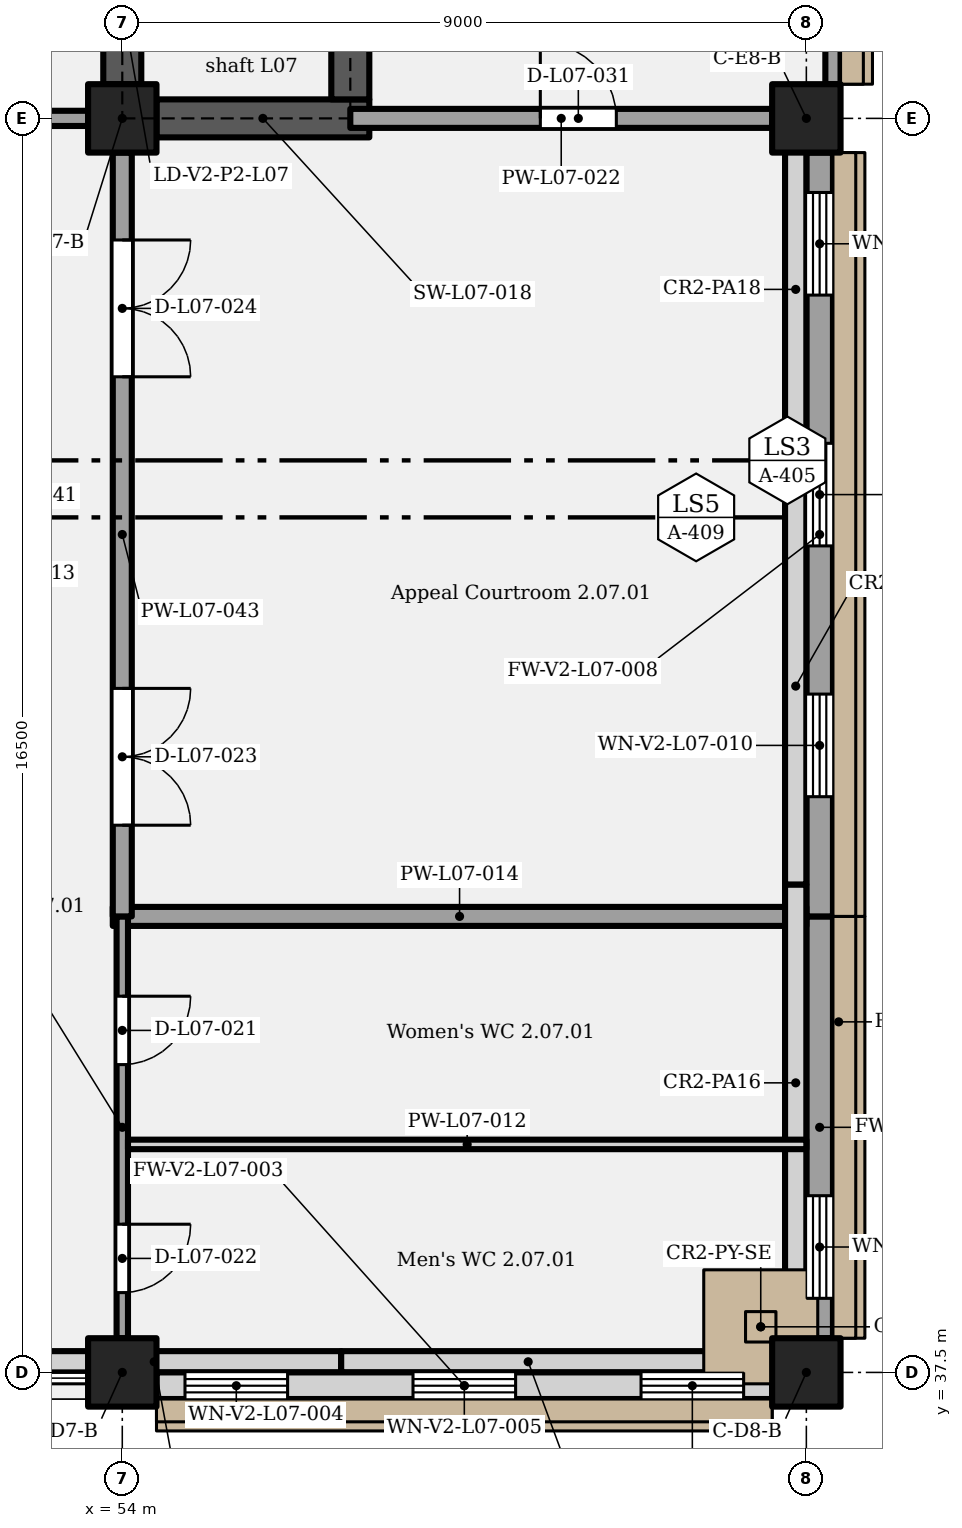
"""IFC4 building model, lengths in metres.
Left out: names, types, materials, properties, quantities, classifications, styles, units other than length and angle.
Written with IfcOpenShell. Run it as: python <this file> out.ifc"""

import sys

from ifc_helpers import new_model, si_unit, direction, frame, frame_2d, origin, origin_2d, place, context, subcontext, project, spatial, rectangle, extrude, element, fill, save


model = new_model("IFC4")
c1 = context("Model", 3, precision=1e-05, world=origin(), true_north=direction((0.0, 1.0)))
c2 = subcontext(c1, "Body", "Model", "MODEL_VIEW")
j1 = project(units=[si_unit("LENGTHUNIT", "METRE"), si_unit("PLANEANGLEUNIT", "RADIAN")], contexts=[c1])
p1 = place(None, origin())
s1 = spatial("IfcSite", under=j1, at=p1, CompositionType="ELEMENT")
p2 = place(p1, origin())
s2 = spatial("IfcBuilding", under=s1, at=p2, CompositionType="ELEMENT")
p3 = place(p2, frame((0.0, 0.0, 39.0)))
s3 = spatial("IfcBuildingStorey", under=s2, at=p3, CompositionType="ELEMENT", Elevation=39.0)
for number, where, z_axis, x_axis in (
    (1, (54.0, 37.5, 0.0), (0.0, 0.0, 1.0), (1.0, 0.0, 0.0)),
    (2, (63.0, 37.5, 0.0), (0.0, 0.0, 1.0), (1.0, 0.0, 0.0)),
    (3, (54.0, 54.0, 0.0), (0.0, 0.0, 1.0), (1.0, 0.0, 0.0)),
    (4, (63.0, 54.0, 0.0), (0.0, 0.0, 1.0), (1.0, 0.0, 0.0)),
):
    element("IfcColumn", number, at=place(p3, frame(where, z_axis=z_axis, x_axis=x_axis)), inside=s3, PredefinedType="COLUMN", context=c2, shape_type="SweptSolid", body=[
        extrude(rectangle(XDim=0.9, YDim=0.9, at=origin_2d()), origin(), (0.0, 0.0, 1.0), 5.4),
    ])
p4 = place(p3, frame((54.45, 54.0, 0.0), z_axis=(0.0, 0.0, 1.0), x_axis=(1.0, 0.0, 0.0)))
e5 = element("IfcWall", 5, at=p4, inside=s3, PredefinedType="SHEAR", context=c2, shape_type="SweptSolid", body=[
    extrude(rectangle(XDim=2.8, YDim=0.5, at=frame_2d((1.4, 0.0))), origin(), (0.0, 0.0, 1.0), 5.15),
])
p5 = place(p3, frame((57.0, 54.25, 0.0), z_axis=(0.0, 0.0, 1.0), x_axis=(0.0, 1.0, 0.0)))
e6 = element("IfcWall", 6, at=p5, inside=s3, PredefinedType="SHEAR", context=c2, shape_type="SweptSolid", body=[
    extrude(rectangle(XDim=2.5, YDim=0.5, at=frame_2d((1.25, 0.0))), origin(), (0.0, 0.0, 1.0), 5.15),
])
p6 = place(p3, frame((54.0, 54.45, 0.0), z_axis=(0.0, 0.0, 1.0), x_axis=(0.0, 1.0, 0.0)))
e7 = element("IfcWall", 7, at=p6, inside=s3, PredefinedType="SHEAR", context=c2, shape_type="SweptSolid", body=[
    extrude(rectangle(XDim=11.1, YDim=0.5, at=frame_2d((5.55, 0.0))), origin(), (0.0, 0.0, 1.0), 5.15),
])
p7 = place(p6, frame((0.5, 0.0, 0.0)))
e8 = element("IfcOpeningElement", 8, at=p7, cuts=e7, PredefinedType="OPENING", context=c2, shape_type="SweptSolid", body=[
    extrude(rectangle(XDim=1.1, YDim=2.1, at=frame_2d((0.55, 1.05))), frame((0.0, 0.26, 0.0), z_axis=(0.0, -1.0, 0.0), x_axis=(1.0, 0.0, 0.0)), (0.0, 0.0, 1.0), 0.52),
])
p8 = place(p6, frame((2.95, 0.0, 0.0)))
e9 = element("IfcOpeningElement", 9, at=p8, cuts=e7, PredefinedType="OPENING", context=c2, shape_type="SweptSolid", body=[
    extrude(rectangle(XDim=1.2, YDim=2.1, at=frame_2d((0.6, 1.05))), frame((0.0, 0.26, 0.0), z_axis=(0.0, -1.0, 0.0), x_axis=(1.0, 0.0, 0.0)), (0.0, 0.0, 1.0), 0.52),
])
p9 = place(p3, frame((54.45, 37.325, 0.0), z_axis=(0.0, 0.0, 1.0), x_axis=(1.0, 0.0, 0.0)))
e10 = element("IfcWall", 10, at=p9, inside=s3, PredefinedType="SOLIDWALL", context=c2, shape_type="SweptSolid", body=[
    extrude(rectangle(XDim=8.1, YDim=0.35, at=frame_2d((4.05, 0.0))), origin(), (0.0, 0.0, 1.0), 5.15),
])
p10 = place(p9, frame((0.375, 0.0, 1.2)))
e11 = element("IfcOpeningElement", 11, at=p10, cuts=e10, PredefinedType="OPENING", context=c2, shape_type="SweptSolid", body=[
    extrude(rectangle(XDim=1.35, YDim=3.0, at=frame_2d((0.675, 1.5))), frame((0.0, 0.185, 0.0), z_axis=(0.0, -1.0, 0.0), x_axis=(1.0, 0.0, 0.0)), (0.0, 0.0, 1.0), 0.37),
])
p11 = place(p9, frame((3.375, 0.0, 1.2)))
e12 = element("IfcOpeningElement", 12, at=p11, cuts=e10, PredefinedType="OPENING", context=c2, shape_type="SweptSolid", body=[
    extrude(rectangle(XDim=1.35, YDim=3.0, at=frame_2d((0.675, 1.5))), frame((0.0, 0.185, 0.0), z_axis=(0.0, -1.0, 0.0), x_axis=(1.0, 0.0, 0.0)), (0.0, 0.0, 1.0), 0.37),
])
p12 = place(p9, frame((6.375, 0.0, 1.2)))
e13 = element("IfcOpeningElement", 13, at=p12, cuts=e10, PredefinedType="OPENING", context=c2, shape_type="SweptSolid", body=[
    extrude(rectangle(XDim=1.35, YDim=3.0, at=frame_2d((0.675, 1.5))), frame((0.0, 0.185, 0.0), z_axis=(0.0, -1.0, 0.0), x_axis=(1.0, 0.0, 0.0)), (0.0, 0.0, 1.0), 0.37),
])
p13 = place(p3, frame((63.175, 37.95, 0.0), z_axis=(0.0, 0.0, 1.0), x_axis=(0.0, 1.0, 0.0)))
e14 = element("IfcWall", 14, at=p13, inside=s3, PredefinedType="SOLIDWALL", context=c2, shape_type="SweptSolid", body=[
    extrude(rectangle(XDim=5.55, YDim=0.35, at=frame_2d((2.775, 0.0))), origin(), (0.0, 0.0, 1.0), 5.15),
])
p14 = place(p13, frame((0.525, 0.0, 1.2)))
e15 = element("IfcOpeningElement", 15, at=p14, cuts=e14, PredefinedType="OPENING", context=c2, shape_type="SweptSolid", body=[
    extrude(rectangle(XDim=1.35, YDim=3.0, at=frame_2d((0.675, 1.5))), frame((0.0, 0.185, 0.0), z_axis=(0.0, -1.0, 0.0), x_axis=(1.0, 0.0, 0.0)), (0.0, 0.0, 1.0), 0.37),
])
p15 = place(p3, frame((63.175, 43.5, 0.0), z_axis=(0.0, 0.0, 1.0), x_axis=(0.0, 1.0, 0.0)))
e16 = element("IfcWall", 16, at=p15, inside=s3, PredefinedType="SOLIDWALL", context=c2, shape_type="SweptSolid", body=[
    extrude(rectangle(XDim=10.05, YDim=0.35, at=frame_2d((5.025, 0.0))), origin(), (0.0, 0.0, 1.0), 5.15),
])
p16 = place(p15, frame((1.575, 0.0, 1.2)))
e17 = element("IfcOpeningElement", 17, at=p16, cuts=e16, PredefinedType="OPENING", context=c2, shape_type="SweptSolid", body=[
    extrude(rectangle(XDim=1.35, YDim=3.0, at=frame_2d((0.675, 1.5))), frame((0.0, 0.185, 0.0), z_axis=(0.0, -1.0, 0.0), x_axis=(1.0, 0.0, 0.0)), (0.0, 0.0, 1.0), 0.37),
])
p17 = place(p15, frame((4.875, 0.0, 1.2)))
e18 = element("IfcOpeningElement", 18, at=p17, cuts=e16, PredefinedType="OPENING", context=c2, shape_type="SweptSolid", body=[
    extrude(rectangle(XDim=1.35, YDim=3.0, at=frame_2d((0.675, 1.5))), frame((0.0, 0.185, 0.0), z_axis=(0.0, -1.0, 0.0), x_axis=(1.0, 0.0, 0.0)), (0.0, 0.0, 1.0), 0.37),
])
p18 = place(p15, frame((8.175, 0.0, 1.2)))
e19 = element("IfcOpeningElement", 19, at=p18, cuts=e16, PredefinedType="OPENING", context=c2, shape_type="SweptSolid", body=[
    extrude(rectangle(XDim=1.35, YDim=3.0, at=frame_2d((0.675, 1.5))), frame((0.0, 0.185, 0.0), z_axis=(0.0, -1.0, 0.0), x_axis=(1.0, 0.0, 0.0)), (0.0, 0.0, 1.0), 0.37),
])
p19 = place(p3, frame((63.35, 54.45, 0.0), z_axis=(0.0, 0.0, 1.0), x_axis=(0.0, 1.0, 0.0)))
e20 = element("IfcWall", 20, at=p19, inside=s3, PredefinedType="SOLIDWALL", context=c2, shape_type="SweptSolid", body=[
    extrude(rectangle(XDim=2.55, YDim=0.2, at=frame_2d((1.275, 0.0))), origin(), (0.0, 0.0, 1.0), 5.15),
])
p20 = place(p19, frame((0.525, 0.0, 1.05)))
e21 = element("IfcOpeningElement", 21, at=p20, cuts=e20, PredefinedType="OPENING", context=c2, shape_type="SweptSolid", body=[
    extrude(rectangle(XDim=1.05, YDim=2.4, at=frame_2d((0.525, 1.2))), frame((0.0, 0.11, 0.0), z_axis=(0.0, -1.0, 0.0), x_axis=(1.0, 0.0, 0.0)), (0.0, 0.0, 1.0), 0.22),
])
p21 = place(p3, frame((61.8, 38.1, 5.4), z_axis=(0.0, 0.0, 1.0), x_axis=(1.0, 0.0, 0.0)))
e22 = element("IfcWall", 22, at=p21, inside=s3, PredefinedType="SOLIDWALL", context=c2, shape_type="SweptSolid", body=[
    extrude(rectangle(XDim=1.2, YDim=1.2, at=frame_2d((0.6, 0.0))), origin(), (0.0, 0.0, 1.0), 3.0),
])
p22 = place(p3, frame((51.96, 37.64, 5.4), z_axis=(0.0, 0.0, 1.0), x_axis=(1.0, 0.0, 0.0)))
e23 = element("IfcWall", 23, at=p22, inside=s3, PredefinedType="PARAPET", context=c2, shape_type="SweptSolid", body=[
    extrude(rectangle(XDim=4.92, YDim=0.28, at=frame_2d((2.46, 0.0))), origin(), (0.0, 0.0, 1.0), 1.4),
])
p23 = place(p3, frame((56.88, 37.64, 5.4), z_axis=(0.0, 0.0, 1.0), x_axis=(1.0, 0.0, 0.0)))
e24 = element("IfcWall", 24, at=p23, inside=s3, PredefinedType="PARAPET", context=c2, shape_type="SweptSolid", body=[
    extrude(rectangle(XDim=4.92, YDim=0.28, at=frame_2d((2.46, 0.0))), origin(), (0.0, 0.0, 1.0), 1.2),
])
p24 = place(p3, frame((62.86, 38.7, 5.4), z_axis=(0.0, 0.0, 1.0), x_axis=(0.0, 1.0, 0.0)))
e25 = element("IfcWall", 25, at=p24, inside=s3, PredefinedType="PARAPET", context=c2, shape_type="SweptSolid", body=[
    extrude(rectangle(XDim=5.22, YDim=0.28, at=frame_2d((2.61, 0.0))), origin(), (0.0, 0.0, 1.0), 1.2),
])
p25 = place(p3, frame((62.86, 43.92, 5.4), z_axis=(0.0, 0.0, 1.0), x_axis=(0.0, 1.0, 0.0)))
e26 = element("IfcWall", 26, at=p25, inside=s3, PredefinedType="PARAPET", context=c2, shape_type="SweptSolid", body=[
    extrude(rectangle(XDim=5.22, YDim=0.28, at=frame_2d((2.61, 0.0))), origin(), (0.0, 0.0, 1.0), 1.4),
])
p26 = place(p3, frame((62.86, 49.14, 5.4), z_axis=(0.0, 0.0, 1.0), x_axis=(0.0, 1.0, 0.0)))
e27 = element("IfcWall", 27, at=p26, inside=s3, PredefinedType="PARAPET", context=c2, shape_type="SweptSolid", body=[
    extrude(rectangle(XDim=5.22, YDim=0.28, at=frame_2d((2.61, 0.0))), origin(), (0.0, 0.0, 1.0), 1.6),
])
p27 = place(p3, frame((54.075, 40.5, 0.0), z_axis=(0.0, 0.0, 1.0), x_axis=(1.0, 0.0, 0.0)))
e28 = element("IfcWall", 28, at=p27, inside=s3, PredefinedType="PARTITIONING", context=c2, shape_type="SweptSolid", body=[
    extrude(rectangle(XDim=8.925, YDim=0.125, at=frame_2d((4.462, 0.0))), origin(), (0.0, 0.0, 1.0), 5.15),
])
p28 = place(p3, frame((53.875, 43.5, 0.0), z_axis=(0.0, 0.0, 1.0), x_axis=(1.0, 0.0, 0.0)))
e29 = element("IfcWall", 29, at=p28, inside=s3, PredefinedType="PARTITIONING", context=c2, shape_type="SweptSolid", body=[
    extrude(rectangle(XDim=9.125, YDim=0.25, at=frame_2d((4.562, 0.0))), origin(), (0.0, 0.0, 1.0), 5.15),
])
p29 = place(p3, frame((49.5, 54.0, 0.0), z_axis=(0.0, 0.0, 1.0), x_axis=(1.0, 0.0, 0.0)))
e30 = element("IfcWall", 30, at=p29, inside=s3, PredefinedType="PARTITIONING", context=c2, shape_type="SweptSolid", body=[
    extrude(rectangle(XDim=4.05, YDim=0.2, at=frame_2d((2.025, 0.0))), origin(), (0.0, 0.0, 1.0), 4.4),
])
p30 = place(p29, frame((1.35, 0.0, 0.0)))
e31 = element("IfcOpeningElement", 31, at=p30, cuts=e30, PredefinedType="OPENING", context=c2, shape_type="SweptSolid", body=[
    extrude(rectangle(XDim=1.8, YDim=2.1, at=frame_2d((0.9, 1.05))), frame((0.0, 0.11, 0.0), z_axis=(0.0, -1.0, 0.0), x_axis=(1.0, 0.0, 0.0)), (0.0, 0.0, 1.0), 0.22),
])
p31 = place(p3, frame((57.0, 54.0, 0.0), z_axis=(0.0, 0.0, 1.0), x_axis=(1.0, 0.0, 0.0)))
e32 = element("IfcWall", 32, at=p31, inside=s3, PredefinedType="PARTITIONING", context=c2, shape_type="SweptSolid", body=[
    extrude(rectangle(XDim=5.55, YDim=0.25, at=frame_2d((2.775, 0.0))), origin(), (0.0, 0.0, 1.0), 4.4),
])
p32 = place(p31, frame((2.5, 0.0, 0.0)))
e33 = element("IfcOpeningElement", 33, at=p32, cuts=e32, PredefinedType="OPENING", context=c2, shape_type="SweptSolid", body=[
    extrude(rectangle(XDim=1.0, YDim=2.1, at=frame_2d((0.5, 1.05))), frame((0.0, 0.135, 0.0), z_axis=(0.0, -1.0, 0.0), x_axis=(1.0, 0.0, 0.0)), (0.0, 0.0, 1.0), 0.27),
])
p33 = place(p3, frame((54.0, 37.95, 0.0), z_axis=(0.0, 0.0, 1.0), x_axis=(0.0, 1.0, 0.0)))
e34 = element("IfcWall", 34, at=p33, inside=s3, PredefinedType="PARTITIONING", context=c2, shape_type="SweptSolid", body=[
    extrude(rectangle(XDim=5.55, YDim=0.15, at=frame_2d((2.775, 0.0))), origin(), (0.0, 0.0, 1.0), 4.2),
])
p34 = place(p33, frame((4.5, 0.0, 0.0), z_axis=(0.0, 0.0, 1.0), x_axis=(-1.0, 0.0, 0.0)))
e35 = element("IfcOpeningElement", 35, at=p34, cuts=e34, PredefinedType="OPENING", context=c2, shape_type="SweptSolid", body=[
    extrude(rectangle(XDim=0.9, YDim=2.1, at=frame_2d((0.45, 1.05))), frame((0.0, 0.085, 0.0), z_axis=(0.0, -1.0, 0.0), x_axis=(1.0, 0.0, 0.0)), (0.0, 0.0, 1.0), 0.17),
])
p35 = place(p33, frame((1.5, 0.0, 0.0), z_axis=(0.0, 0.0, 1.0), x_axis=(-1.0, 0.0, 0.0)))
e36 = element("IfcOpeningElement", 36, at=p35, cuts=e34, PredefinedType="OPENING", context=c2, shape_type="SweptSolid", body=[
    extrude(rectangle(XDim=0.9, YDim=2.1, at=frame_2d((0.45, 1.05))), frame((0.0, 0.085, 0.0), z_axis=(0.0, -1.0, 0.0), x_axis=(1.0, 0.0, 0.0)), (0.0, 0.0, 1.0), 0.17),
])
p36 = place(p3, frame((54.0, 43.5, 0.0), z_axis=(0.0, 0.0, 1.0), x_axis=(0.0, 1.0, 0.0)))
e37 = element("IfcWall", 37, at=p36, inside=s3, PredefinedType="PARTITIONING", context=c2, shape_type="SweptSolid", body=[
    extrude(rectangle(XDim=10.05, YDim=0.25, at=frame_2d((5.025, 0.0))), origin(), (0.0, 0.0, 1.0), 4.2),
])
p37 = place(p36, frame((3.0, 0.0, 0.0), z_axis=(0.0, 0.0, 1.0), x_axis=(-1.0, 0.0, 0.0)))
e38 = element("IfcOpeningElement", 38, at=p37, cuts=e37, PredefinedType="OPENING", context=c2, shape_type="SweptSolid", body=[
    extrude(rectangle(XDim=1.8, YDim=2.4, at=frame_2d((0.9, 1.2))), frame((0.0, 0.135, 0.0), z_axis=(0.0, -1.0, 0.0), x_axis=(1.0, 0.0, 0.0)), (0.0, 0.0, 1.0), 0.27),
])
p38 = place(p36, frame((8.9, 0.0, 0.0), z_axis=(0.0, 0.0, 1.0), x_axis=(-1.0, 0.0, 0.0)))
e39 = element("IfcOpeningElement", 39, at=p38, cuts=e37, PredefinedType="OPENING", context=c2, shape_type="SweptSolid", body=[
    extrude(rectangle(XDim=1.8, YDim=2.4, at=frame_2d((0.9, 1.2))), frame((0.0, 0.135, 0.0), z_axis=(0.0, -1.0, 0.0), x_axis=(1.0, 0.0, 0.0)), (0.0, 0.0, 1.0), 0.27),
])
p39 = place(p10, origin())
e40 = element("IfcWindow", 40, at=p39, inside=s3, PartitioningType="SINGLE_PANEL", PredefinedType="WINDOW", context=c2, shape_type="SweptSolid", body=[
    extrude(rectangle(XDim=1.35, YDim=3.0, at=frame_2d((0.675, 1.5))), frame((0.0, 0.03, 0.0), z_axis=(0.0, -1.0, 0.0), x_axis=(1.0, 0.0, 0.0)), (0.0, 0.0, 1.0), 0.06),
])
fill(e11, e40)
p40 = place(p11, origin())
e41 = element("IfcWindow", 41, at=p40, inside=s3, PartitioningType="SINGLE_PANEL", PredefinedType="WINDOW", context=c2, shape_type="SweptSolid", body=[
    extrude(rectangle(XDim=1.35, YDim=3.0, at=frame_2d((0.675, 1.5))), frame((0.0, 0.03, 0.0), z_axis=(0.0, -1.0, 0.0), x_axis=(1.0, 0.0, 0.0)), (0.0, 0.0, 1.0), 0.06),
])
fill(e12, e41)
p41 = place(p12, origin())
e42 = element("IfcWindow", 42, at=p41, inside=s3, PartitioningType="SINGLE_PANEL", PredefinedType="WINDOW", context=c2, shape_type="SweptSolid", body=[
    extrude(rectangle(XDim=1.35, YDim=3.0, at=frame_2d((0.675, 1.5))), frame((0.0, 0.03, 0.0), z_axis=(0.0, -1.0, 0.0), x_axis=(1.0, 0.0, 0.0)), (0.0, 0.0, 1.0), 0.06),
])
fill(e13, e42)
p42 = place(p14, origin())
e43 = element("IfcWindow", 43, at=p42, inside=s3, PartitioningType="SINGLE_PANEL", PredefinedType="WINDOW", context=c2, shape_type="SweptSolid", body=[
    extrude(rectangle(XDim=1.35, YDim=3.0, at=frame_2d((0.675, 1.5))), frame((0.0, 0.03, 0.0), z_axis=(0.0, -1.0, 0.0), x_axis=(1.0, 0.0, 0.0)), (0.0, 0.0, 1.0), 0.06),
])
fill(e15, e43)
p43 = place(p16, origin())
e44 = element("IfcWindow", 44, at=p43, inside=s3, PartitioningType="SINGLE_PANEL", PredefinedType="WINDOW", context=c2, shape_type="SweptSolid", body=[
    extrude(rectangle(XDim=1.35, YDim=3.0, at=frame_2d((0.675, 1.5))), frame((0.0, 0.03, 0.0), z_axis=(0.0, -1.0, 0.0), x_axis=(1.0, 0.0, 0.0)), (0.0, 0.0, 1.0), 0.06),
])
fill(e17, e44)
p44 = place(p17, origin())
e45 = element("IfcWindow", 45, at=p44, inside=s3, PartitioningType="SINGLE_PANEL", PredefinedType="WINDOW", context=c2, shape_type="SweptSolid", body=[
    extrude(rectangle(XDim=1.35, YDim=3.0, at=frame_2d((0.675, 1.5))), frame((0.0, 0.03, 0.0), z_axis=(0.0, -1.0, 0.0), x_axis=(1.0, 0.0, 0.0)), (0.0, 0.0, 1.0), 0.06),
])
fill(e18, e45)
p45 = place(p18, origin())
e46 = element("IfcWindow", 46, at=p45, inside=s3, PartitioningType="SINGLE_PANEL", PredefinedType="WINDOW", context=c2, shape_type="SweptSolid", body=[
    extrude(rectangle(XDim=1.35, YDim=3.0, at=frame_2d((0.675, 1.5))), frame((0.0, 0.03, 0.0), z_axis=(0.0, -1.0, 0.0), x_axis=(1.0, 0.0, 0.0)), (0.0, 0.0, 1.0), 0.06),
])
fill(e19, e46)
p46 = place(p34, origin())
e47 = element("IfcDoor", 47, at=p46, inside=s3, OperationType="SINGLE_SWING_LEFT", PredefinedType="DOOR", context=c2, shape_type="SweptSolid", body=[
    extrude(rectangle(XDim=0.9, YDim=2.1, at=frame_2d((0.45, 1.05))), frame((0.0, 0.025, 0.0), z_axis=(0.0, -1.0, 0.0), x_axis=(1.0, 0.0, 0.0)), (0.0, 0.0, 1.0), 0.05),
])
fill(e35, e47)
p47 = place(p35, origin())
e48 = element("IfcDoor", 48, at=p47, inside=s3, OperationType="SINGLE_SWING_LEFT", PredefinedType="DOOR", context=c2, shape_type="SweptSolid", body=[
    extrude(rectangle(XDim=0.9, YDim=2.1, at=frame_2d((0.45, 1.05))), frame((0.0, 0.025, 0.0), z_axis=(0.0, -1.0, 0.0), x_axis=(1.0, 0.0, 0.0)), (0.0, 0.0, 1.0), 0.05),
])
fill(e36, e48)
p48 = place(p37, origin())
e49 = element("IfcDoor", 49, at=p48, inside=s3, OperationType="DOUBLE_DOOR_SINGLE_SWING", PredefinedType="DOOR", context=c2, shape_type="SweptSolid", body=[
    extrude(rectangle(XDim=1.8, YDim=2.4, at=frame_2d((0.9, 1.2))), frame((0.0, 0.025, 0.0), z_axis=(0.0, -1.0, 0.0), x_axis=(1.0, 0.0, 0.0)), (0.0, 0.0, 1.0), 0.05),
])
fill(e38, e49)
p49 = place(p38, origin())
e50 = element("IfcDoor", 50, at=p49, inside=s3, OperationType="DOUBLE_DOOR_SINGLE_SWING", PredefinedType="DOOR", context=c2, shape_type="SweptSolid", body=[
    extrude(rectangle(XDim=1.8, YDim=2.4, at=frame_2d((0.9, 1.2))), frame((0.0, 0.025, 0.0), z_axis=(0.0, -1.0, 0.0), x_axis=(1.0, 0.0, 0.0)), (0.0, 0.0, 1.0), 0.05),
])
fill(e39, e50)
p50 = place(p32, origin())
e51 = element("IfcDoor", 51, at=p50, inside=s3, OperationType="SINGLE_SWING_LEFT", PredefinedType="DOOR", context=c2, shape_type="SweptSolid", body=[
    extrude(rectangle(XDim=1.0, YDim=2.1, at=frame_2d((0.5, 1.05))), frame((0.0, 0.025, 0.0), z_axis=(0.0, -1.0, 0.0), x_axis=(1.0, 0.0, 0.0)), (0.0, 0.0, 1.0), 0.05),
])
fill(e33, e51)
save(model, sys.argv[1])
